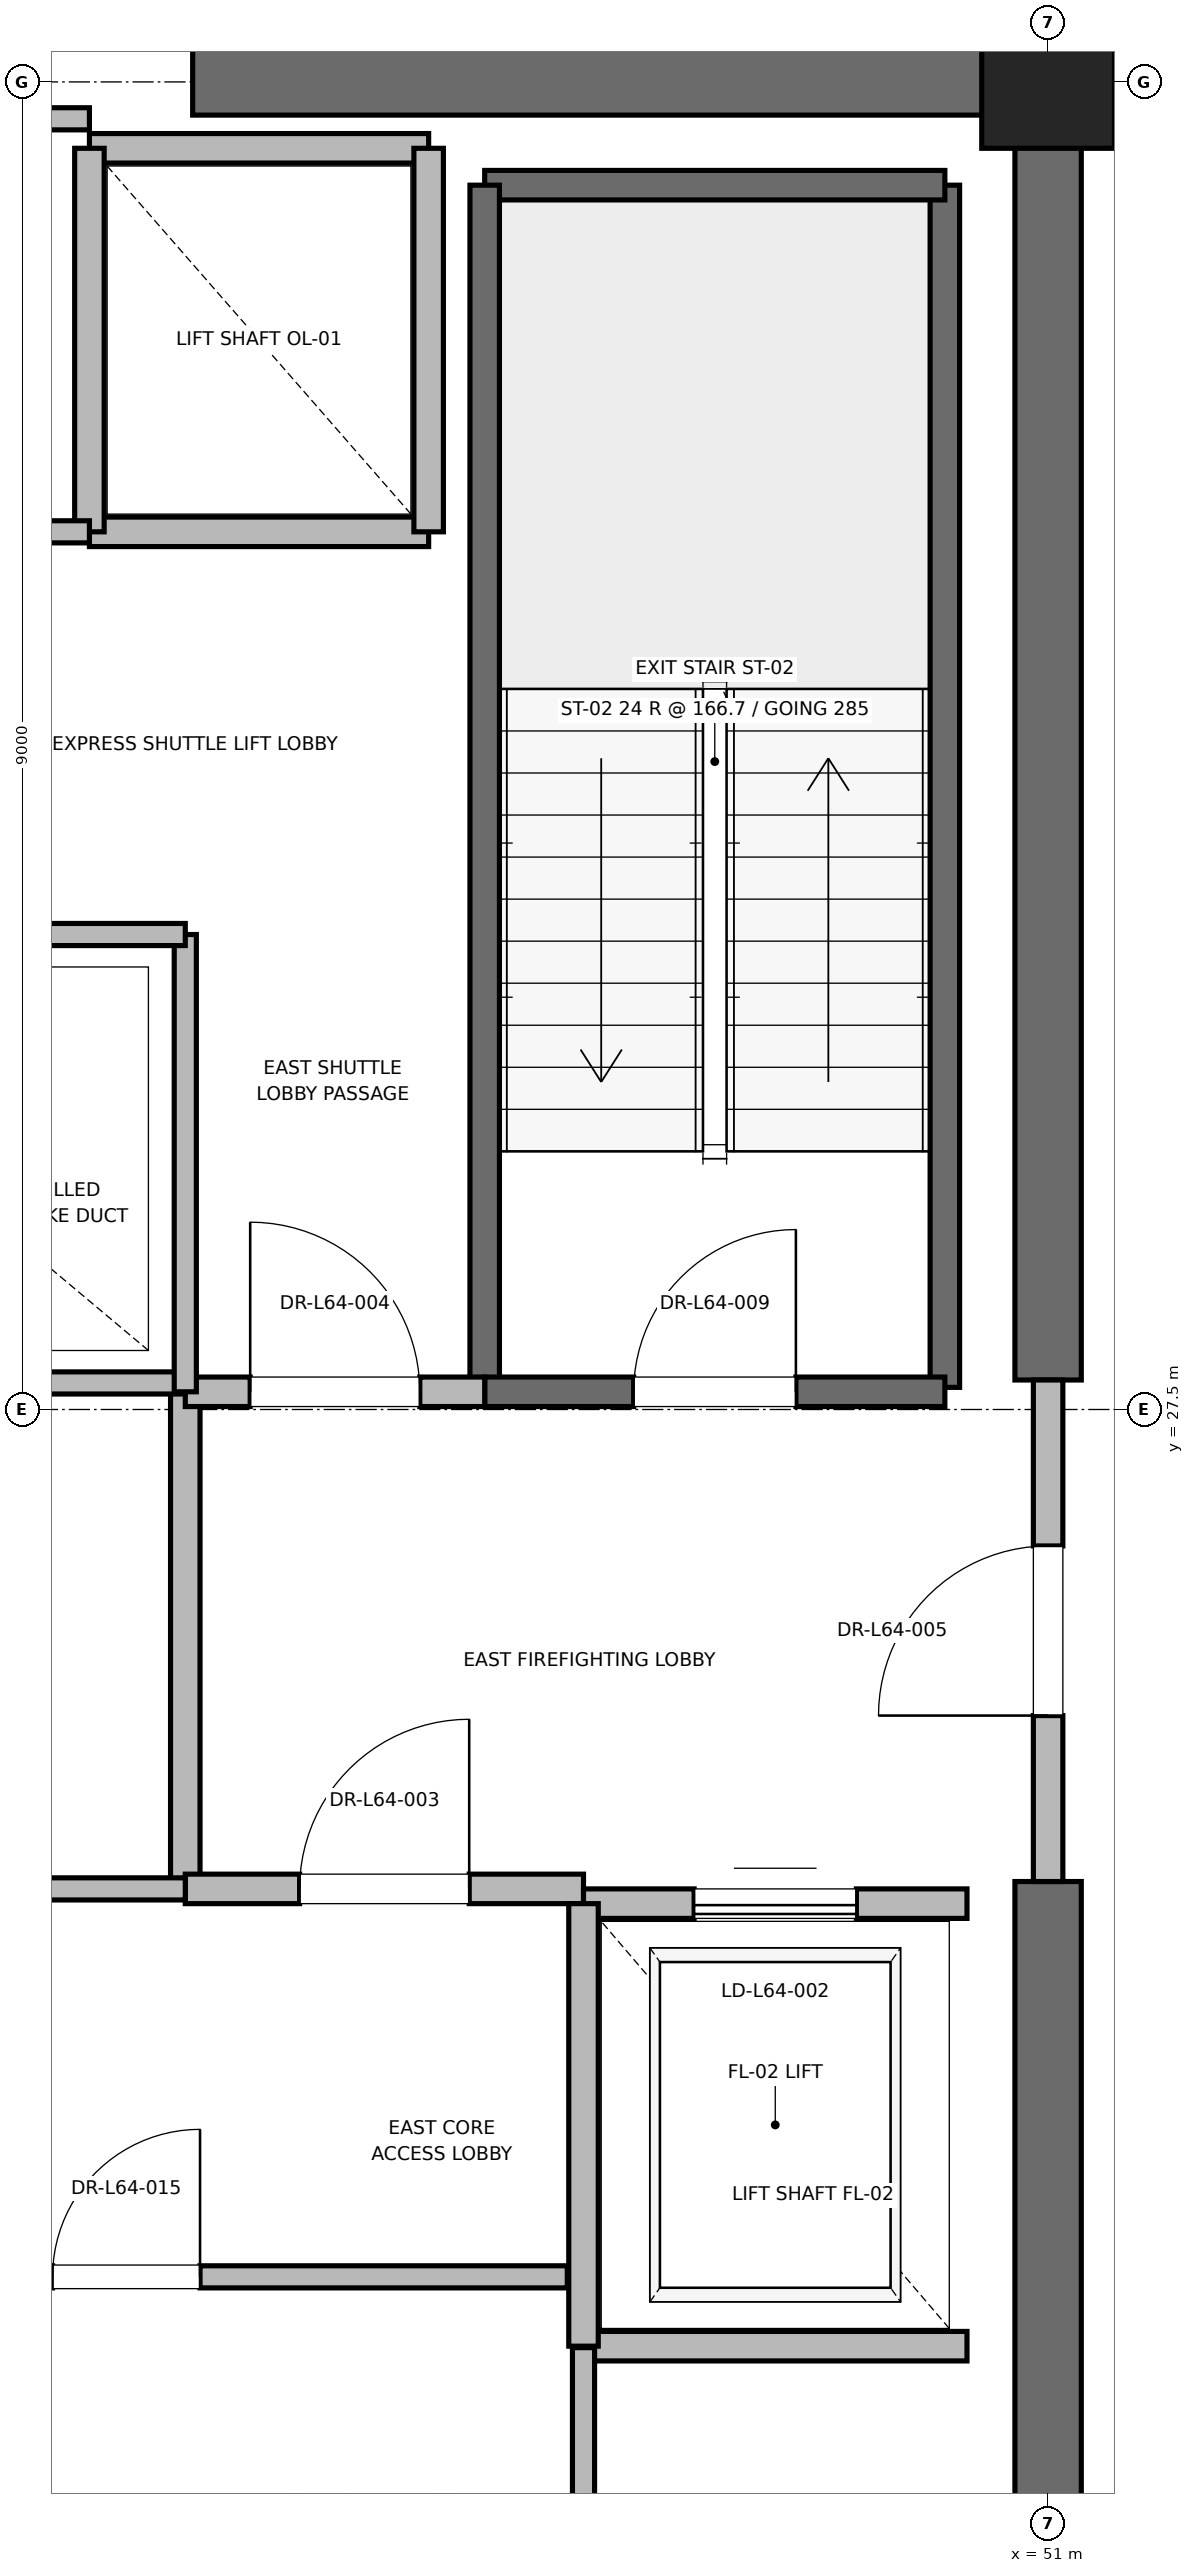
"""IFC4 building model, lengths in metres.
Left out: names, types, materials, properties, quantities, classifications, styles, units other than length and angle.
Written with IfcOpenShell. Run it as: python <this file> out.ifc"""

import sys

from ifc_helpers import new_model, si_unit, direction, frame, frame_2d, origin, origin_2d, place, context, subcontext, project, spatial, rectangle, extrude, element, fill, save


model = new_model("IFC4")
c1 = context("Model", 3, precision=1e-05, world=origin(), true_north=direction((0.0, 1.0)))
c2 = subcontext(c1, "Body", "Model", "MODEL_VIEW")
j1 = project(units=[si_unit("LENGTHUNIT", "METRE"), si_unit("PLANEANGLEUNIT", "RADIAN")], contexts=[c1])
p1 = place(None, origin())
s1 = spatial("IfcSite", under=j1, at=p1, CompositionType="ELEMENT")
p2 = place(p1, origin())
s2 = spatial("IfcBuilding", under=s1, at=p2, CompositionType="ELEMENT")
p3 = place(p2, frame((0.0, 0.0, 275.2)))
s3 = spatial("IfcBuildingStorey", under=s2, at=p3, CompositionType="ELEMENT", Elevation=275.2)
p4 = place(p3, frame((51.0, 36.5, 0.0), z_axis=(0.0, 0.0, 1.0), x_axis=(1.0, 0.0, 0.0)))
e1 = element("IfcColumn", 1, at=p4, inside=s3, PredefinedType="PILASTER", context=c2, shape_type="SweptSolid", body=[
    extrude(rectangle(XDim=0.9, YDim=0.9, at=origin_2d()), origin(), (0.0, 0.0, 1.0), 4.0),
])
for number, where, z_axis, x_axis in (
    (2, (45.2, 36.5, 0.0), (0.0, 0.0, 1.0), (1.0, 0.0, 0.0)),
    (3, (51.0, 18.5, 0.0), (0.0, 0.0, 1.0), (0.0, 1.0, 0.0)),
):
    element("IfcWall", number, at=place(p3, frame(where, z_axis=z_axis, x_axis=x_axis)), inside=s3, PredefinedType="SHEAR", context=c2, shape_type="SweptSolid", body=[
        extrude(rectangle(XDim=5.8, YDim=0.45, at=frame_2d((2.9, 0.0))), origin(), (0.0, 0.0, 1.0), 3.785),
    ])
p5 = place(p3, frame((51.0, 27.7, 0.0), z_axis=(0.0, 0.0, 1.0), x_axis=(0.0, 1.0, 0.0)))
e4 = element("IfcWall", 4, at=p5, inside=s3, PredefinedType="SHEAR", context=c2, shape_type="SweptSolid", body=[
    extrude(rectangle(XDim=8.8, YDim=0.45, at=frame_2d((4.4, 0.0))), origin(), (0.0, 0.0, 1.0), 3.785),
])
p6 = place(p3, frame((50.3, 27.65, 0.0), z_axis=(0.0, 0.0, 1.0), x_axis=(0.0, 1.0, 0.0)))
e5 = element("IfcWall", 5, at=p6, inside=s3, PredefinedType="SOLIDWALL", context=c2, shape_type="SweptSolid", body=[
    extrude(rectangle(XDim=8.15, YDim=0.2, at=frame_2d((4.075, 0.0))), origin(), (0.0, 0.0, 1.0), 3.785),
])
p7 = place(p3, frame((47.18, 35.8, 0.0), z_axis=(0.0, 0.0, 1.0), x_axis=(1.0, 0.0, 0.0)))
e6 = element("IfcWall", 6, at=p7, inside=s3, PredefinedType="SOLIDWALL", context=c2, shape_type="SweptSolid", body=[
    extrude(rectangle(XDim=3.12, YDim=0.2, at=frame_2d((1.56, 0.0))), origin(), (0.0, 0.0, 1.0), 3.785),
])
p8 = place(p3, frame((47.18, 27.62, 0.0), z_axis=(0.0, 0.0, 1.0), x_axis=(0.0, 1.0, 0.0)))
e7 = element("IfcWall", 7, at=p8, inside=s3, PredefinedType="SOLIDWALL", context=c2, shape_type="SweptSolid", body=[
    extrude(rectangle(XDim=8.18, YDim=0.2, at=frame_2d((4.09, 0.0))), origin(), (0.0, 0.0, 1.0), 3.785),
])
p9 = place(p3, frame((47.18, 27.62, 0.0), z_axis=(0.0, 0.0, 1.0), x_axis=(1.0, 0.0, 0.0)))
e8 = element("IfcWall", 8, at=p9, inside=s3, PredefinedType="SOLIDWALL", context=c2, shape_type="SweptSolid", body=[
    extrude(rectangle(XDim=3.12, YDim=0.2, at=frame_2d((1.56, 0.0))), origin(), (0.0, 0.0, 1.0), 3.785),
])
p10 = place(p9, frame((1.01, 0.0, 0.0)))
e9 = element("IfcOpeningElement", 9, at=p10, cuts=e8, PredefinedType="OPENING", context=c2, shape_type="SweptSolid", body=[
    extrude(rectangle(XDim=1.1, YDim=2.15, at=frame_2d((0.55, 1.075))), frame((0.0, 0.1, 0.0), z_axis=(0.0, -1.0, 0.0), x_axis=(1.0, 0.0, 0.0)), (0.0, 0.0, 1.0), 0.2),
])
p11 = place(p3, frame((45.15, 24.25, 0.0), z_axis=(0.0, 0.0, 1.0), x_axis=(0.0, 1.0, 0.0)))
e10 = element("IfcWall", 10, at=p11, inside=s3, PredefinedType="PARTITIONING", context=c2, shape_type="SweptSolid", body=[
    extrude(rectangle(XDim=3.37, YDim=0.2, at=frame_2d((1.685, 0.0))), origin(), (0.0, 0.0, 1.0), 3.785),
])
p12 = place(p3, frame((45.15, 24.25, 0.0), z_axis=(0.0, 0.0, 1.0), x_axis=(1.0, 0.0, 0.0)))
e11 = element("IfcWall", 11, at=p12, inside=s3, PredefinedType="PARTITIONING", context=c2, shape_type="SweptSolid", body=[
    extrude(rectangle(XDim=2.7, YDim=0.2, at=frame_2d((1.35, 0.0))), origin(), (0.0, 0.0, 1.0), 3.785),
])
p13 = place(p12, frame((0.775, 0.0, 0.0)))
e12 = element("IfcOpeningElement", 12, at=p13, cuts=e11, PredefinedType="OPENING", context=c2, shape_type="SweptSolid", body=[
    extrude(rectangle(XDim=1.15, YDim=2.2, at=frame_2d((0.575, 1.1))), frame((0.0, 0.1, 0.0), z_axis=(0.0, -1.0, 0.0), x_axis=(1.0, 0.0, 0.0)), (0.0, 0.0, 1.0), 0.2),
])
p14 = place(p3, frame((45.15, 27.62, 0.0), z_axis=(0.0, 0.0, 1.0), x_axis=(1.0, 0.0, 0.0)))
e13 = element("IfcWall", 13, at=p14, inside=s3, PredefinedType="PARTITIONING", context=c2, shape_type="SweptSolid", body=[
    extrude(rectangle(XDim=2.03, YDim=0.2, at=frame_2d((1.015, 0.0))), origin(), (0.0, 0.0, 1.0), 3.785),
])
p15 = place(p14, frame((0.44, 0.0, 0.0)))
e14 = element("IfcOpeningElement", 14, at=p15, cuts=e13, PredefinedType="OPENING", context=c2, shape_type="SweptSolid", body=[
    extrude(rectangle(XDim=1.15, YDim=2.2, at=frame_2d((0.575, 1.1))), frame((0.0, 0.1, 0.0), z_axis=(0.0, -1.0, 0.0), x_axis=(1.0, 0.0, 0.0)), (0.0, 0.0, 1.0), 0.2),
])
p16 = place(p3, frame((51.0, 24.3, 0.0), z_axis=(0.0, 0.0, 1.0), x_axis=(0.0, 1.0, 0.0)))
e15 = element("IfcWall", 15, at=p16, inside=s3, PredefinedType="PARTITIONING", context=c2, shape_type="SweptSolid", body=[
    extrude(rectangle(XDim=3.4, YDim=0.2, at=frame_2d((1.7, 0.0))), origin(), (0.0, 0.0, 1.0), 2.865),
])
p17 = place(p16, frame((1.125, 0.0, 0.0)))
e16 = element("IfcOpeningElement", 16, at=p17, cuts=e15, PredefinedType="OPENING", context=c2, shape_type="SweptSolid", body=[
    extrude(rectangle(XDim=1.15, YDim=2.2, at=frame_2d((0.575, 1.1))), frame((0.0, 0.1, 0.0), z_axis=(0.0, -1.0, 0.0), x_axis=(1.0, 0.0, 0.0)), (0.0, 0.0, 1.0), 0.2),
])
p18 = place(p3, frame((47.85, 21.15, 0.0), z_axis=(0.0, 0.0, 1.0), x_axis=(1.0, 0.0, 0.0)))
e17 = element("IfcWall", 17, at=p18, inside=s3, PredefinedType="SOLIDWALL", context=c2, shape_type="SweptSolid", body=[
    extrude(rectangle(XDim=2.6, YDim=0.2, at=frame_2d((1.3, 0.0))), origin(), (0.0, 0.0, 1.0), 3.785),
])
p19 = place(p3, frame((50.45, 24.15, 0.0), z_axis=(0.0, 0.0, 1.0), x_axis=(-1.0, 0.0, 0.0)))
e18 = element("IfcWall", 18, at=p19, inside=s3, PredefinedType="SOLIDWALL", context=c2, shape_type="SweptSolid", body=[
    extrude(rectangle(XDim=2.6, YDim=0.2, at=frame_2d((1.3, 0.0))), origin(), (0.0, 0.0, 1.0), 2.865),
])
p20 = place(p19, frame((0.75, 0.0, 0.0)))
e19 = element("IfcOpeningElement", 19, at=p20, cuts=e18, PredefinedType="OPENING", context=c2, shape_type="SweptSolid", body=[
    extrude(rectangle(XDim=1.1, YDim=2.2, at=frame_2d((0.55, 1.1))), frame((0.0, 0.1, 0.0), z_axis=(0.0, -1.0, 0.0), x_axis=(1.0, 0.0, 0.0)), (0.0, 0.0, 1.0), 0.2),
])
p21 = place(p3, frame((47.85, 24.15, 0.0), z_axis=(0.0, 0.0, 1.0), x_axis=(0.0, -1.0, 0.0)))
e20 = element("IfcWall", 20, at=p21, inside=s3, PredefinedType="SOLIDWALL", context=c2, shape_type="SweptSolid", body=[
    extrude(rectangle(XDim=3.0, YDim=0.2, at=frame_2d((1.5, 0.0))), origin(), (0.0, 0.0, 1.0), 3.785),
])
p22 = place(p3, frame((44.5, 33.45, 0.0), z_axis=(0.0, 0.0, 1.0), x_axis=(1.0, 0.0, 0.0)))
e21 = element("IfcWall", 21, at=p22, inside=s3, PredefinedType="SOLIDWALL", context=c2, shape_type="SweptSolid", body=[
    extrude(rectangle(XDim=2.3, YDim=0.2, at=frame_2d((1.15, 0.0))), origin(), (0.0, 0.0, 1.0), 3.785),
])
p23 = place(p3, frame((46.8, 36.05, 0.0), z_axis=(0.0, 0.0, 1.0), x_axis=(-1.0, 0.0, 0.0)))
e22 = element("IfcWall", 22, at=p23, inside=s3, PredefinedType="SOLIDWALL", context=c2, shape_type="SweptSolid", body=[
    extrude(rectangle(XDim=2.3, YDim=0.2, at=frame_2d((1.15, 0.0))), origin(), (0.0, 0.0, 1.0), 2.865),
])
p24 = place(p3, frame((44.5, 36.05, 0.0), z_axis=(0.0, 0.0, 1.0), x_axis=(0.0, -1.0, 0.0)))
e23 = element("IfcWall", 23, at=p24, inside=s3, PredefinedType="SOLIDWALL", context=c2, shape_type="SweptSolid", body=[
    extrude(rectangle(XDim=2.6, YDim=0.2, at=frame_2d((1.3, 0.0))), origin(), (0.0, 0.0, 1.0), 2.865),
])
p25 = place(p3, frame((46.8, 33.45, 0.0), z_axis=(0.0, 0.0, 1.0), x_axis=(0.0, 1.0, 0.0)))
e24 = element("IfcWall", 24, at=p25, inside=s3, PredefinedType="SOLIDWALL", context=c2, shape_type="SweptSolid", body=[
    extrude(rectangle(XDim=2.6, YDim=0.2, at=frame_2d((1.3, 0.0))), origin(), (0.0, 0.0, 1.0), 3.785),
])
p26 = place(p3, frame((41.56, 27.68, 0.0), z_axis=(0.0, 0.0, 1.0), x_axis=(1.0, 0.0, 0.0)))
e25 = element("IfcWall", 25, at=p26, inside=s3, PredefinedType="PARTITIONING", context=c2, shape_type="SweptSolid", body=[
    extrude(rectangle(XDim=3.59, YDim=0.15, at=frame_2d((1.795, 0.0))), origin(), (0.0, 0.0, 1.0), 2.85),
])
p27 = place(p3, frame((47.85, 18.6, 0.0), z_axis=(0.0, 0.0, 1.0), x_axis=(0.0, 1.0, 0.0)))
e26 = element("IfcWall", 26, at=p27, inside=s3, PredefinedType="PARTITIONING", context=c2, shape_type="SweptSolid", body=[
    extrude(rectangle(XDim=2.54, YDim=0.15, at=frame_2d((1.27, 0.0))), origin(), (0.0, 0.0, 1.0), 2.85),
])
p28 = place(p3, frame((41.76, 21.62, 0.0), z_axis=(0.0, 0.0, 1.0), x_axis=(1.0, 0.0, 0.0)))
e27 = element("IfcWall", 27, at=p28, inside=s3, PredefinedType="PARTITIONING", context=c2, shape_type="SweptSolid", body=[
    extrude(rectangle(XDim=5.98, YDim=0.15, at=frame_2d((2.99, 0.0))), origin(), (0.0, 0.0, 1.0), 2.85),
])
p29 = place(p28, frame((2.49, 0.0, 0.0)))
e28 = element("IfcOpeningElement", 28, at=p29, cuts=e27, PredefinedType="OPENING", context=c2, shape_type="SweptSolid", body=[
    extrude(rectangle(XDim=1.0, YDim=2.15, at=frame_2d((0.5, 1.075))), frame((0.0, 0.075, 0.0), z_axis=(0.0, -1.0, 0.0), x_axis=(1.0, 0.0, 0.0)), (0.0, 0.0, 1.0), 0.15),
])
p30 = place(p3, frame((41.76, 24.25, 0.0), z_axis=(0.0, 0.0, 1.0), x_axis=(1.0, 0.0, 0.0)))
e29 = element("IfcWall", 29, at=p30, inside=s3, PredefinedType="PARTITIONING", context=c2, shape_type="SweptSolid", body=[
    extrude(rectangle(XDim=3.39, YDim=0.15, at=frame_2d((1.695, 0.0))), origin(), (0.0, 0.0, 1.0), 2.85),
])
p31 = place(p30, frame((1.195, 0.0, 0.0)))
e30 = element("IfcOpeningElement", 30, at=p31, cuts=e29, PredefinedType="OPENING", context=c2, shape_type="SweptSolid", body=[
    extrude(rectangle(XDim=1.0, YDim=2.15, at=frame_2d((0.5, 1.075))), frame((0.0, 0.075, 0.0), z_axis=(0.0, -1.0, 0.0), x_axis=(1.0, 0.0, 0.0)), (0.0, 0.0, 1.0), 0.15),
])
p32 = place(p3, frame((45.15, 27.62, 0.0), z_axis=(0.0, 0.0, 1.0), x_axis=(0.0, 1.0, 0.0)))
e31 = element("IfcWall", 31, at=p32, inside=s3, PredefinedType="PARTITIONING", context=c2, shape_type="SweptSolid", body=[
    extrude(rectangle(XDim=3.1, YDim=0.15, at=frame_2d((1.55, 0.0))), origin(), (0.0, 0.0, 1.0), 2.85),
])
p33 = place(p3, frame((41.56, 30.72, 0.0), z_axis=(0.0, 0.0, 1.0), x_axis=(1.0, 0.0, 0.0)))
e32 = element("IfcWall", 32, at=p33, inside=s3, PredefinedType="PARTITIONING", context=c2, shape_type="SweptSolid", body=[
    extrude(rectangle(XDim=3.59, YDim=0.15, at=frame_2d((1.795, 0.0))), origin(), (0.0, 0.0, 1.0), 2.85),
])
p34 = place(p33, frame((1.355, 0.0, 0.0)))
e33 = element("IfcOpeningElement", 33, at=p34, cuts=e32, PredefinedType="OPENING", context=c2, shape_type="SweptSolid", body=[
    extrude(rectangle(XDim=0.88, YDim=2.1, at=frame_2d((0.44, 1.05))), frame((0.0, 0.075, 0.0), z_axis=(0.0, -1.0, 0.0), x_axis=(1.0, 0.0, 0.0)), (0.0, 0.0, 1.0), 0.15),
])
p35 = place(p3, frame((41.56, 36.25, 0.0), z_axis=(0.0, 0.0, 1.0), x_axis=(1.0, 0.0, 0.0)))
e34 = element("IfcWall", 34, at=p35, inside=s3, PredefinedType="PARTITIONING", context=c2, shape_type="SweptSolid", body=[
    extrude(rectangle(XDim=2.94, YDim=0.15, at=frame_2d((1.47, 0.0))), origin(), (0.0, 0.0, 1.0), 2.85),
])
p36 = place(p3, frame((41.56, 33.45, 0.0), z_axis=(0.0, 0.0, 1.0), x_axis=(1.0, 0.0, 0.0)))
e35 = element("IfcWall", 35, at=p36, inside=s3, PredefinedType="PARTITIONING", context=c2, shape_type="SweptSolid", body=[
    extrude(rectangle(XDim=2.94, YDim=0.15, at=frame_2d((1.47, 0.0))), origin(), (0.0, 0.0, 1.0), 2.85),
])
p37 = place(p36, frame((1.03, 0.0, 0.0)))
e36 = element("IfcOpeningElement", 36, at=p37, cuts=e35, PredefinedType="OPENING", context=c2, shape_type="SweptSolid", body=[
    extrude(rectangle(XDim=0.88, YDim=2.1, at=frame_2d((0.44, 1.05))), frame((0.0, 0.075, 0.0), z_axis=(0.0, -1.0, 0.0), x_axis=(1.0, 0.0, 0.0)), (0.0, 0.0, 1.0), 0.15),
])
p38 = place(p10, origin())
e37 = element("IfcDoor", 37, at=p38, inside=s3, OperationType="SINGLE_SWING_RIGHT", PredefinedType="DOOR", context=c2, shape_type="SweptSolid", body=[
    extrude(rectangle(XDim=1.1, YDim=2.15, at=frame_2d((0.55, 1.075))), frame((0.0, 0.025, 0.0), z_axis=(0.0, -1.0, 0.0), x_axis=(1.0, 0.0, 0.0)), (0.0, 0.0, 1.0), 0.05),
])
fill(e9, e37)
p39 = place(p13, origin())
e38 = element("IfcDoor", 38, at=p39, inside=s3, OperationType="SINGLE_SWING_RIGHT", PredefinedType="DOOR", context=c2, shape_type="SweptSolid", body=[
    extrude(rectangle(XDim=1.15, YDim=2.2, at=frame_2d((0.575, 1.1))), frame((0.0, 0.025, 0.0), z_axis=(0.0, -1.0, 0.0), x_axis=(1.0, 0.0, 0.0)), (0.0, 0.0, 1.0), 0.05),
])
fill(e12, e38)
p40 = place(p15, origin())
e39 = element("IfcDoor", 39, at=p40, inside=s3, OperationType="SINGLE_SWING_LEFT", PredefinedType="DOOR", context=c2, shape_type="SweptSolid", body=[
    extrude(rectangle(XDim=1.15, YDim=2.2, at=frame_2d((0.575, 1.1))), frame((0.0, 0.025, 0.0), z_axis=(0.0, -1.0, 0.0), x_axis=(1.0, 0.0, 0.0)), (0.0, 0.0, 1.0), 0.05),
])
fill(e14, e39)
p41 = place(p17, origin())
e40 = element("IfcDoor", 40, at=p41, inside=s3, OperationType="SINGLE_SWING_LEFT", PredefinedType="DOOR", context=c2, shape_type="SweptSolid", body=[
    extrude(rectangle(XDim=1.15, YDim=2.2, at=frame_2d((0.575, 1.1))), frame((0.0, 0.025, 0.0), z_axis=(0.0, -1.0, 0.0), x_axis=(1.0, 0.0, 0.0)), (0.0, 0.0, 1.0), 0.05),
])
fill(e16, e40)
p42 = place(p20, origin())
e41 = element("IfcDoor", 41, at=p42, inside=s3, OperationType="SLIDING_TO_RIGHT", PredefinedType="DOOR", context=c2, shape_type="SweptSolid", body=[
    extrude(rectangle(XDim=1.1, YDim=2.2, at=frame_2d((0.55, 1.1))), frame((0.0, 0.025, 0.0), z_axis=(0.0, -1.0, 0.0), x_axis=(1.0, 0.0, 0.0)), (0.0, 0.0, 1.0), 0.05),
])
fill(e19, e41)
p43 = place(p29, origin())
e42 = element("IfcDoor", 42, at=p43, inside=s3, OperationType="SINGLE_SWING_RIGHT", PredefinedType="DOOR", context=c2, shape_type="SweptSolid", body=[
    extrude(rectangle(XDim=1.0, YDim=2.15, at=frame_2d((0.5, 1.075))), frame((0.0, 0.025, 0.0), z_axis=(0.0, -1.0, 0.0), x_axis=(1.0, 0.0, 0.0)), (0.0, 0.0, 1.0), 0.05),
])
fill(e28, e42)
save(model, sys.argv[1])
